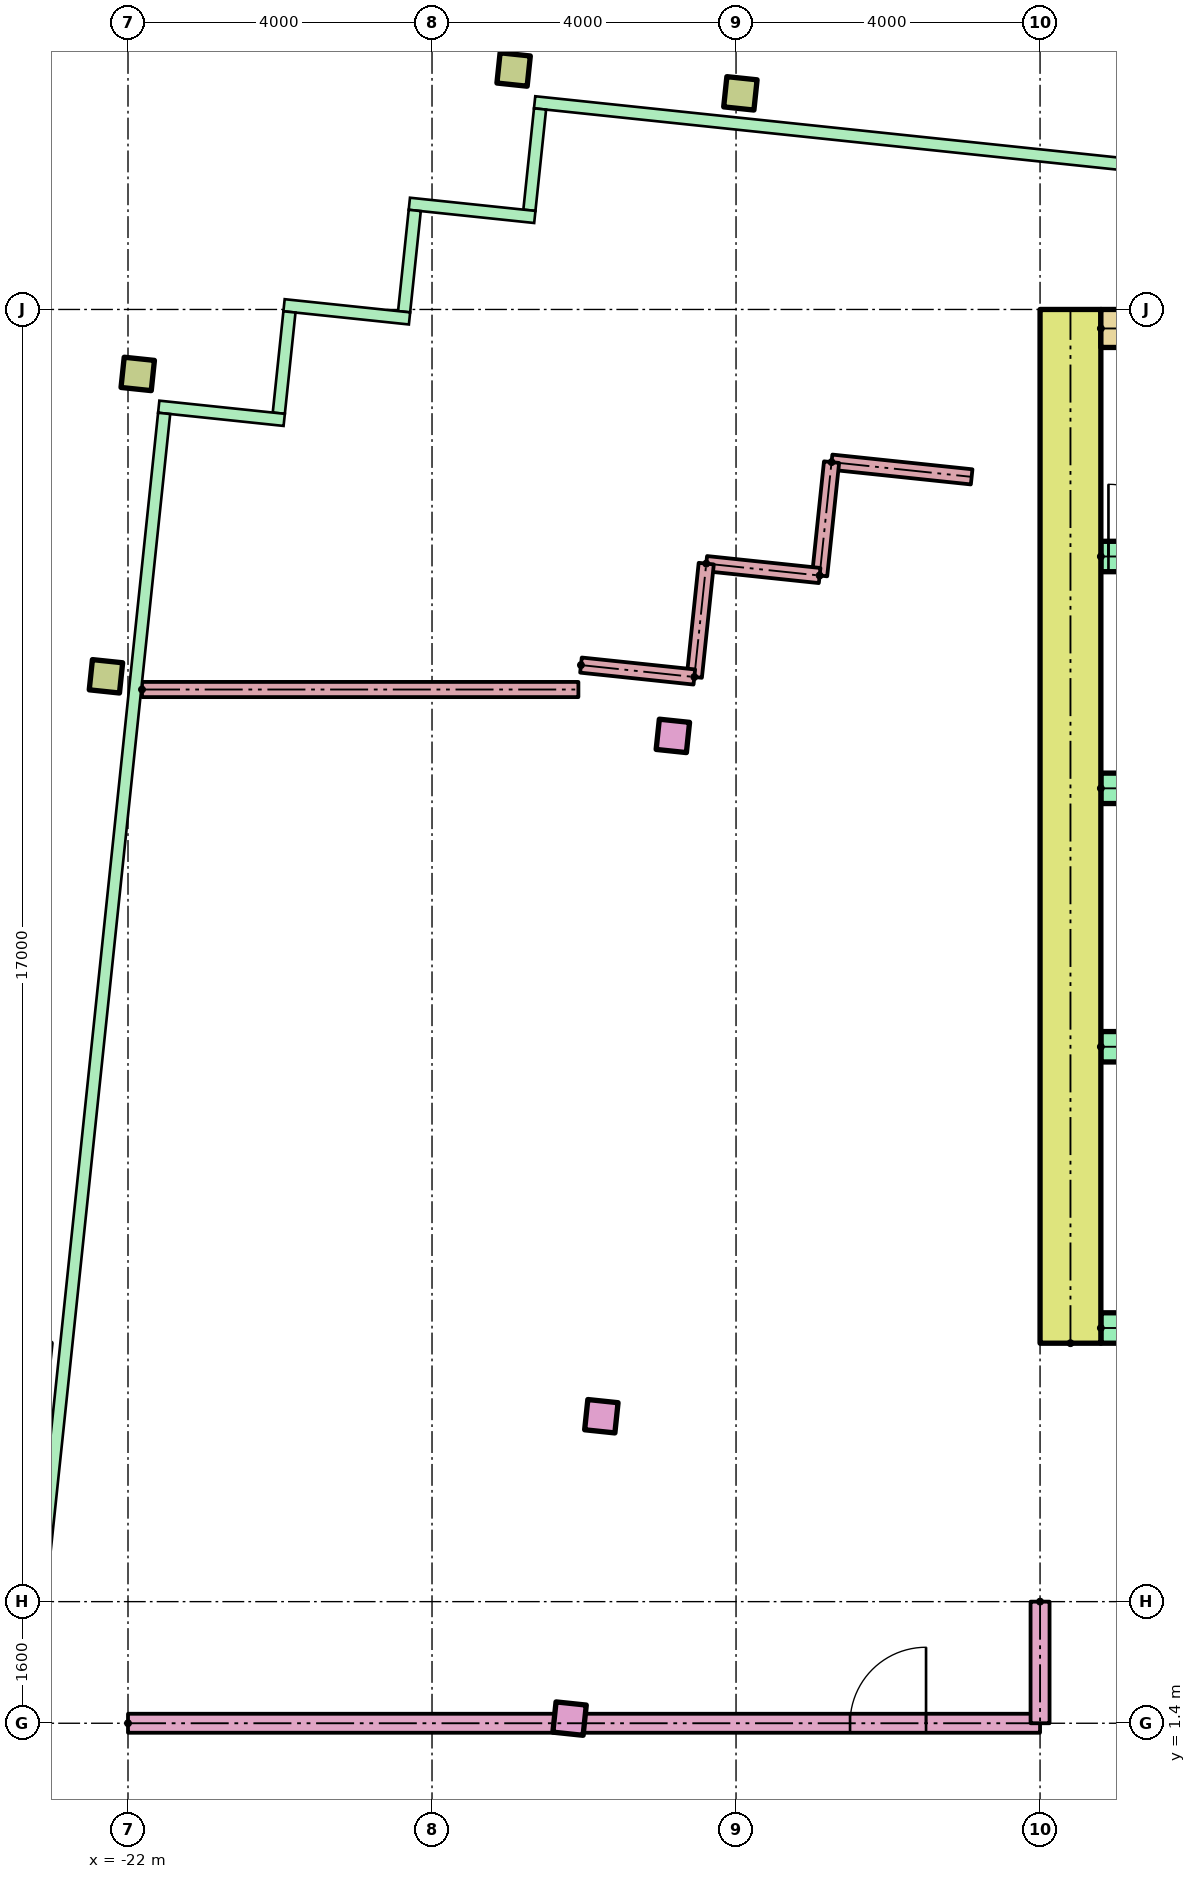
"""IFC4 building model, lengths in metres.
Left out: names, types, materials, properties, quantities, classifications, styles, units other than length and angle.
Written with IfcOpenShell. Run it as: python <this file> out.ifc"""

import sys

from ifc_helpers import new_model, si_unit, direction, frame, frame_2d, origin, origin_2d, place, context, subcontext, project, spatial, rectangle, hollow_rectangle, extrude, element, fill, save


model = new_model("IFC4")
c1 = context("Model", 3, precision=1e-05, world=origin(), true_north=direction((0.0, 1.0)))
c2 = subcontext(c1, "Body", "Model", "MODEL_VIEW")
j1 = project(units=[si_unit("LENGTHUNIT", "METRE"), si_unit("PLANEANGLEUNIT", "RADIAN")], contexts=[c1])
p1 = place(None, origin())
s1 = spatial("IfcSite", under=j1, at=p1, CompositionType="ELEMENT")
p2 = place(p1, origin())
s2 = spatial("IfcBuilding", under=s1, at=p2, CompositionType="ELEMENT")
p3 = place(p2, frame((0.0, 0.0, 298.3)))
s3 = spatial("IfcBuildingStorey", under=s2, at=p3, CompositionType="ELEMENT", Elevation=298.3)
for number, where, z_axis, x_axis in (
    (1, (-16.19, 1.461, 0.0), (0.0, 0.0, 1.0), (0.995, -0.105, 0.0)),
    (2, (-15.772, 5.439, 0.0), (0.0, 0.0, 1.0), (0.995, -0.105, 0.0)),
):
    element("IfcColumn", number, at=place(p3, frame(where, z_axis=z_axis, x_axis=x_axis)), inside=s3, PredefinedType="COLUMN", context=c2, shape_type="SweptSolid", body=[
        extrude(rectangle(XDim=0.4, YDim=0.4, at=origin_2d()), origin(), (0.0, 0.0, 1.0), 3.4),
    ])
p4 = place(p3, frame((-22.29, 15.174, 0.0), z_axis=(0.0, 0.0, 1.0), x_axis=(0.994521895368, -0.104528463268, 0.0)))
e3 = element("IfcColumn", 3, at=p4, inside=s3, PredefinedType="COLUMN", context=c2, shape_type="SweptSolid", body=[
    extrude(hollow_rectangle(XDim=0.4, YDim=0.4, WallThickness=0.02, at=origin_2d()), origin(), (0.0, 0.0, 1.0), 3.4),
])
p5 = place(p3, frame((-14.831, 14.39, 0.0), z_axis=(0.0, 0.0, 1.0), x_axis=(0.994521895368, -0.104528463268, 0.0)))
e4 = element("IfcColumn", 4, at=p5, inside=s3, PredefinedType="COLUMN", context=c2, shape_type="SweptSolid", body=[
    extrude(rectangle(XDim=0.4, YDim=0.4, at=origin_2d()), origin(), (0.0, 0.0, 1.0), 3.4),
])
for number, where, z_axis, x_axis in (
    (5, (-21.872, 19.152, 0.0), (0.0, 0.0, 1.0), (0.995, -0.105, 0.0)),
    (6, (-16.926, 23.157, 0.0), (0.0, 0.0, 1.0), (0.995, -0.105, 0.0)),
    (7, (-13.943, 22.843, 0.0), (0.0, 0.0, 1.0), (0.995, -0.105, 0.0)),
):
    element("IfcColumn", number, at=place(p3, frame(where, z_axis=z_axis, x_axis=x_axis)), inside=s3, PredefinedType="COLUMN", context=c2, shape_type="SweptSolid", body=[
        extrude(hollow_rectangle(XDim=0.4, YDim=0.4, WallThickness=0.02, at=origin_2d()), origin(), (0.0, 0.0, 1.0), 3.4),
    ])
p6 = place(p3, frame((-9.6, 6.4, 0.0), z_axis=(0.0, 0.0, 1.0), x_axis=(0.0, 1.0, 0.0)))
e8 = element("IfcWall", 8, at=p6, inside=s3, PredefinedType="SHEAR", context=c2, shape_type="SweptSolid", body=[
    extrude(rectangle(XDim=13.6, YDim=0.8, at=frame_2d((6.8, 0.0))), origin(), (0.0, 0.0, 1.0), 2.9),
])
p7 = place(p3, frame((-9.2, 19.75, 0.0)))
e9 = element("IfcWall", 9, at=p7, inside=s3, PredefinedType="SHEAR", context=c2, shape_type="SweptSolid", body=[
    extrude(rectangle(XDim=18.4, YDim=0.5, at=frame_2d((9.2, 0.0))), origin(), (0.0, 0.0, 1.0), 2.9),
])
p8 = place(p3, frame((-9.2, 6.6, 0.0)))
e10 = element("IfcWall", 10, at=p8, inside=s3, PredefinedType="SHEAR", context=c2, shape_type="SweptSolid", body=[
    extrude(rectangle(XDim=18.4, YDim=0.4, at=frame_2d((9.2, 0.0))), origin(), (0.0, 0.0, 1.0), 2.9),
])
p9 = place(p8, frame((8.3, 0.0, 0.0)))
e11 = element("IfcOpeningElement", 11, at=p9, cuts=e10, PredefinedType="OPENING", context=c2, shape_type="SweptSolid", body=[
    extrude(rectangle(XDim=1.8, YDim=2.1, at=frame_2d((0.9, 1.05))), frame((0.0, 0.21, 0.0), z_axis=(0.0, -1.0, 0.0), x_axis=(1.0, 0.0, 0.0)), (0.0, 0.0, 1.0), 0.42),
])
p10 = place(p8, frame((3.8, 0.0, 0.0)))
e12 = element("IfcOpeningElement", 12, at=p10, cuts=e10, PredefinedType="OPENING", context=c2, shape_type="SweptSolid", body=[
    extrude(rectangle(XDim=1.8, YDim=2.1, at=frame_2d((0.9, 1.05))), frame((0.0, 0.21, 0.0), z_axis=(0.0, -1.0, 0.0), x_axis=(1.0, 0.0, 0.0)), (0.0, 0.0, 1.0), 0.42),
])
p11 = place(p8, frame((12.8, 0.0, 0.0)))
e13 = element("IfcOpeningElement", 13, at=p11, cuts=e10, PredefinedType="OPENING", context=c2, shape_type="SweptSolid", body=[
    extrude(rectangle(XDim=1.8, YDim=2.1, at=frame_2d((0.9, 1.05))), frame((0.0, 0.21, 0.0), z_axis=(0.0, -1.0, 0.0), x_axis=(1.0, 0.0, 0.0)), (0.0, 0.0, 1.0), 0.42),
])
p12 = place(p3, frame((-9.2, 10.3, 0.0)))
e14 = element("IfcWall", 14, at=p12, inside=s3, PredefinedType="SHEAR", context=c2, shape_type="SweptSolid", body=[
    extrude(rectangle(XDim=8.0, YDim=0.4, at=frame_2d((4.0, 0.0))), origin(), (0.0, 0.0, 1.0), 2.9),
])
p13 = place(p12, frame((3.35, 0.0, 0.0)))
e15 = element("IfcOpeningElement", 15, at=p13, cuts=e14, PredefinedType="OPENING", context=c2, shape_type="SweptSolid", body=[
    extrude(rectangle(XDim=1.1, YDim=2.1, at=frame_2d((0.55, 1.05))), frame((0.0, 0.21, 0.0), z_axis=(0.0, -1.0, 0.0), x_axis=(1.0, 0.0, 0.0)), (0.0, 0.0, 1.0), 0.42),
])
p14 = place(p12, frame((6.083, 0.0, 0.0)))
e16 = element("IfcOpeningElement", 16, at=p14, cuts=e14, PredefinedType="OPENING", context=c2, shape_type="SweptSolid", body=[
    extrude(rectangle(XDim=1.1, YDim=2.1, at=frame_2d((0.55, 1.05))), frame((0.0, 0.21, 0.0), z_axis=(0.0, -1.0, 0.0), x_axis=(1.0, 0.0, 0.0)), (0.0, 0.0, 1.0), 0.42),
])
p15 = place(p12, frame((0.917, 0.0, 0.0)))
e17 = element("IfcOpeningElement", 17, at=p15, cuts=e14, PredefinedType="OPENING", context=c2, shape_type="SweptSolid", body=[
    extrude(rectangle(XDim=1.0, YDim=2.1, at=frame_2d((0.5, 1.05))), frame((0.0, 0.21, 0.0), z_axis=(0.0, -1.0, 0.0), x_axis=(1.0, 0.0, 0.0)), (0.0, 0.0, 1.0), 0.42),
])
p16 = place(p3, frame((-9.2, 13.7, 0.0)))
e18 = element("IfcWall", 18, at=p16, inside=s3, PredefinedType="SHEAR", context=c2, shape_type="SweptSolid", body=[
    extrude(rectangle(XDim=8.0, YDim=0.4, at=frame_2d((4.0, 0.0))), origin(), (0.0, 0.0, 1.0), 2.9),
])
p17 = place(p3, frame((-9.2, 16.75, 0.0)))
e19 = element("IfcWall", 19, at=p17, inside=s3, PredefinedType="SHEAR", context=c2, shape_type="SweptSolid", body=[
    extrude(rectangle(XDim=18.4, YDim=0.4, at=frame_2d((9.2, 0.0))), origin(), (0.0, 0.0, 1.0), 2.9),
])
p18 = place(p17, frame((0.1, 0.0, 0.0)))
e20 = element("IfcOpeningElement", 20, at=p18, cuts=e19, PredefinedType="OPENING", context=c2, shape_type="SweptSolid", body=[
    extrude(rectangle(XDim=0.95, YDim=2.1, at=frame_2d((0.475, 1.05))), frame((0.0, 0.21, 0.0), z_axis=(0.0, -1.0, 0.0), x_axis=(1.0, 0.0, 0.0)), (0.0, 0.0, 1.0), 0.42),
])
p19 = place(p17, frame((6.1, 0.0, 0.0)))
e21 = element("IfcOpeningElement", 21, at=p19, cuts=e19, PredefinedType="OPENING", context=c2, shape_type="SweptSolid", body=[
    extrude(rectangle(XDim=0.95, YDim=2.1, at=frame_2d((0.475, 1.05))), frame((0.0, 0.21, 0.0), z_axis=(0.0, -1.0, 0.0), x_axis=(1.0, 0.0, 0.0)), (0.0, 0.0, 1.0), 0.42),
])
p20 = place(p17, frame((12.1, 0.0, 0.0)))
e22 = element("IfcOpeningElement", 22, at=p20, cuts=e19, PredefinedType="OPENING", context=c2, shape_type="SweptSolid", body=[
    extrude(rectangle(XDim=0.95, YDim=2.1, at=frame_2d((0.475, 1.05))), frame((0.0, 0.21, 0.0), z_axis=(0.0, -1.0, 0.0), x_axis=(1.0, 0.0, 0.0)), (0.0, 0.0, 1.0), 0.42),
])
p21 = place(p3, frame((-22.0, 1.4, 0.0)))
e23 = element("IfcWall", 23, at=p21, inside=s3, PredefinedType="PARTITIONING", context=c2, shape_type="SweptSolid", body=[
    extrude(rectangle(XDim=12.0, YDim=0.25, at=frame_2d((6.0, 0.0))), origin(), (0.0, 0.0, 1.0), 2.6),
])
p22 = place(p21, frame((9.5, 0.0, 0.0)))
e24 = element("IfcOpeningElement", 24, at=p22, cuts=e23, PredefinedType="OPENING", context=c2, shape_type="SweptSolid", body=[
    extrude(rectangle(XDim=1.0, YDim=2.1, at=frame_2d((0.5, 1.05))), frame((0.0, 0.135, 0.0), z_axis=(0.0, -1.0, 0.0), x_axis=(1.0, 0.0, 0.0)), (0.0, 0.0, 1.0), 0.27),
])
p23 = place(p3, frame((-10.0, 3.0, 0.0), z_axis=(0.0, 0.0, 1.0), x_axis=(0.0, -1.0, 0.0)))
e25 = element("IfcWall", 25, at=p23, inside=s3, PredefinedType="PARTITIONING", context=c2, shape_type="SweptSolid", body=[
    extrude(rectangle(XDim=1.6, YDim=0.25, at=frame_2d((0.8, 0.0))), origin(), (0.0, 0.0, 1.0), 2.6),
])
p24 = place(p3, frame((-12.743, 17.991, 0.0), z_axis=(0.0, 0.0, 1.0), x_axis=(0.994516993757, -0.104575088471, 0.0)))
e26 = element("IfcWall", 26, at=p24, inside=s3, PredefinedType="PARTITIONING", context=c2, shape_type="SweptSolid", body=[
    extrude(rectangle(XDim=1.854, YDim=0.2, at=frame_2d((0.927, 0.0))), origin(), (0.0, 0.0, 1.0), 0.9),
])
p25 = place(p3, frame((-12.9, 16.5, 0.0), z_axis=(0.0, 0.0, 1.0), x_axis=(0.104481464157, 0.994526834051, 0.0)))
e27 = element("IfcWall", 27, at=p25, inside=s3, PredefinedType="PARTITIONING", context=c2, shape_type="SweptSolid", body=[
    extrude(rectangle(XDim=1.5, YDim=0.2, at=frame_2d((0.75, 0.0))), origin(), (0.0, 0.0, 1.0), 0.9),
])
p26 = place(p3, frame((-14.392, 16.656, 0.0), z_axis=(0.0, 0.0, 1.0), x_axis=(0.994508128223, -0.104659366031, 0.0)))
e28 = element("IfcWall", 28, at=p26, inside=s3, PredefinedType="PARTITIONING", context=c2, shape_type="SweptSolid", body=[
    extrude(rectangle(XDim=1.5, YDim=0.2, at=frame_2d((0.75, 0.0))), origin(), (0.0, 0.0, 1.0), 0.9),
])
p27 = place(p3, frame((-14.549, 15.165, 0.0), z_axis=(0.0, 0.0, 1.0), x_axis=(0.104481464157, 0.994526834051, 0.0)))
e29 = element("IfcWall", 29, at=p27, inside=s3, PredefinedType="PARTITIONING", context=c2, shape_type="SweptSolid", body=[
    extrude(rectangle(XDim=1.5, YDim=0.2, at=frame_2d((0.75, 0.0))), origin(), (0.0, 0.0, 1.0), 0.9),
])
p28 = place(p3, frame((-16.04, 15.321, 0.0), z_axis=(0.0, 0.0, 1.0), x_axis=(0.994525057048, -0.104498377516, 0.0)))
e30 = element("IfcWall", 30, at=p28, inside=s3, PredefinedType="PARTITIONING", context=c2, shape_type="SweptSolid", body=[
    extrude(rectangle(XDim=1.5, YDim=0.2, at=frame_2d((0.75, 0.0))), origin(), (0.0, 0.0, 1.0), 0.9),
])
p29 = place(p3, frame((-21.816, 15.0, 0.0)))
e31 = element("IfcWall", 31, at=p29, inside=s3, PredefinedType="PARTITIONING", context=c2, shape_type="SweptSolid", body=[
    extrude(rectangle(XDim=5.742, YDim=0.2, at=frame_2d((2.871, 0.0))), origin(), (0.0, 0.0, 1.0), 0.9),
])
p30 = place(p18, origin())
e32 = element("IfcDoor", 32, at=p30, inside=s3, OperationType="SINGLE_SWING_LEFT", PredefinedType="DOOR", context=c2, shape_type="SweptSolid", body=[
    extrude(rectangle(XDim=0.95, YDim=2.1, at=frame_2d((0.475, 1.05))), frame((0.0, 0.025, 0.0), z_axis=(0.0, -1.0, 0.0), x_axis=(1.0, 0.0, 0.0)), (0.0, 0.0, 1.0), 0.05),
])
fill(e20, e32)
p31 = place(p22, origin())
e33 = element("IfcDoor", 33, at=p31, inside=s3, OperationType="SINGLE_SWING_RIGHT", PredefinedType="DOOR", context=c2, shape_type="SweptSolid", body=[
    extrude(rectangle(XDim=1.0, YDim=2.1, at=frame_2d((0.5, 1.05))), frame((0.0, 0.025, 0.0), z_axis=(0.0, -1.0, 0.0), x_axis=(1.0, 0.0, 0.0)), (0.0, 0.0, 1.0), 0.05),
])
fill(e24, e33)
save(model, sys.argv[1])
